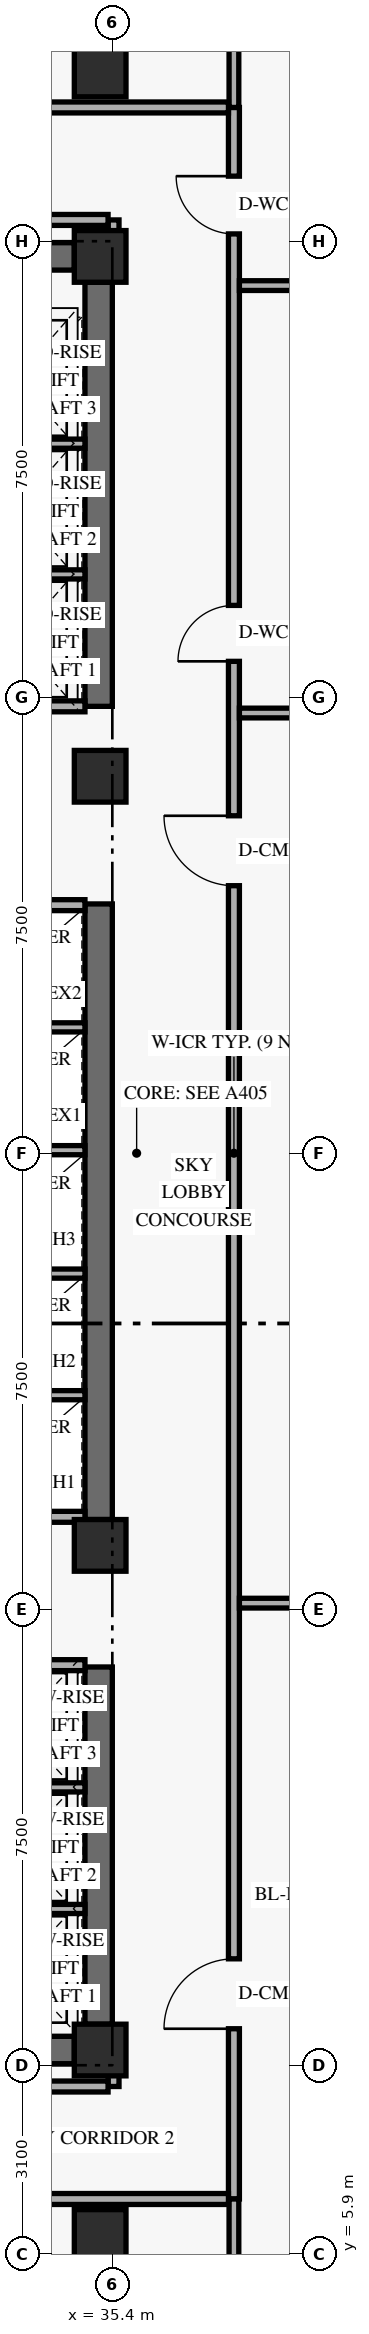
"""IFC4 building model, lengths in metres.
Left out: names, types, materials, properties, quantities, classifications, styles, units other than length and angle.
Written with IfcOpenShell. Run it as: python <this file> out.ifc"""

import sys

from ifc_helpers import new_model, si_unit, direction, frame, frame_2d, origin, origin_2d, place, context, subcontext, project, spatial, rectangle, extrude, element, fill, save


model = new_model("IFC4")
c1 = context("Model", 3, precision=1e-05, world=origin(), true_north=direction((0.0, 1.0)))
c2 = subcontext(c1, "Body", "Model", "MODEL_VIEW")
j1 = project(units=[si_unit("LENGTHUNIT", "METRE"), si_unit("PLANEANGLEUNIT", "RADIAN")], contexts=[c1])
p1 = place(None, origin())
s1 = spatial("IfcSite", under=j1, at=p1, CompositionType="ELEMENT")
p2 = place(p1, origin())
s2 = spatial("IfcBuilding", under=s1, at=p2, CompositionType="ELEMENT")
p3 = place(p2, frame((0.0, 0.0, 98.4)))
s3 = spatial("IfcBuildingStorey", under=s2, at=p3, CompositionType="ELEMENT", Elevation=98.4)
p4 = place(p3, frame((35.175, 9.675, 0.0), z_axis=(0.0, 0.0, 1.0), x_axis=(0.0, 1.0, 0.0)))
e1 = element("IfcWall", 1, at=p4, inside=s3, PredefinedType="SHEAR", context=c2, shape_type="SweptSolid", body=[
    extrude(rectangle(XDim=5.875, YDim=0.45, at=frame_2d((2.938, 0.0))), origin(), (0.0, 0.0, 1.0), 3.349),
])
p5 = place(p3, frame((35.175, 17.975, 0.0), z_axis=(0.0, 0.0, 1.0), x_axis=(0.0, 1.0, 0.0)))
e2 = element("IfcWall", 2, at=p5, inside=s3, PredefinedType="SHEAR", context=c2, shape_type="SweptSolid", body=[
    extrude(rectangle(XDim=10.125, YDim=0.45, at=frame_2d((5.062, 0.0))), origin(), (0.0, 0.0, 1.0), 3.349),
])
p6 = place(p3, frame((35.175, 31.35, 0.0), z_axis=(0.0, 0.0, 1.0), x_axis=(0.0, 1.0, 0.0)))
e3 = element("IfcWall", 3, at=p6, inside=s3, PredefinedType="SHEAR", context=c2, shape_type="SweptSolid", body=[
    extrude(rectangle(XDim=6.975, YDim=0.45, at=frame_2d((3.487, 0.0))), origin(), (0.0, 0.0, 1.0), 3.349),
])
for number, where, z_axis, x_axis in (
    (4, (24.625, 9.25, 0.0), (0.0, 0.0, 1.0), (1.0, 0.0, 0.0)),
    (5, (24.625, 38.75, 0.0), (0.0, 0.0, 1.0), (1.0, 0.0, 0.0)),
):
    element("IfcWall", number, at=place(p3, frame(where, z_axis=z_axis, x_axis=x_axis)), inside=s3, PredefinedType="SHEAR", context=c2, shape_type="SweptSolid", body=[
        extrude(rectangle(XDim=10.15, YDim=0.45, at=frame_2d((5.075, 0.0))), origin(), (0.0, 0.0, 1.0), 3.96),
    ])
for number, where, z_axis, x_axis in (
    (6, (35.2, 6.2, 0.0), (0.0, 0.0, 1.0), (1.0, 0.0, 0.0)),
    (7, (35.2, 9.25, 0.0), (0.0, 0.0, 1.0), (1.0, 0.0, 0.0)),
    (8, (35.2, 17.55, 0.0), (0.0, 0.0, 1.0), (1.0, 0.0, 0.0)),
    (9, (35.2, 30.2, 0.0), (0.0, 0.0, 1.0), (1.0, 0.0, 0.0)),
    (10, (35.2, 38.75, 0.0), (0.0, 0.0, 1.0), (1.0, 0.0, 0.0)),
    (11, (35.2, 41.8, 0.0), (0.0, 0.0, 1.0), (1.0, 0.0, 0.0)),
):
    element("IfcColumn", number, at=place(p3, frame(where, z_axis=z_axis, x_axis=x_axis)), inside=s3, PredefinedType="COLUMN", context=c2, shape_type="SweptSolid", body=[
        extrude(rectangle(XDim=0.85, YDim=0.85, at=origin_2d()), origin(), (0.0, 0.0, 1.0), 4.2),
    ])
p7 = place(p3, frame((32.74, 15.58, 0.0), z_axis=(0.0, 0.0, 1.0), x_axis=(1.0, 0.0, 0.0)))
e12 = element("IfcWall", 12, at=p7, inside=s3, PredefinedType="STANDARD", context=c2, shape_type="SweptSolid", body=[
    extrude(rectangle(XDim=2.21, YDim=0.18, at=frame_2d((1.105, 0.0))), origin(), (0.0, 0.0, 1.0), 3.96),
])
for number, where, z_axis, x_axis in (
    (13, (32.74, 11.57, 0.0), (0.0, 0.0, 1.0), (1.0, 0.0, 0.0)),
    (14, (32.74, 13.57, 0.0), (0.0, 0.0, 1.0), (1.0, 0.0, 0.0)),
):
    element("IfcWall", number, at=place(p3, frame(where, z_axis=z_axis, x_axis=x_axis)), inside=s3, PredefinedType="STANDARD", context=c2, shape_type="SweptSolid", body=[
        extrude(rectangle(XDim=2.21, YDim=0.15, at=frame_2d((1.105, 0.0))), origin(), (0.0, 0.0, 1.0), 3.96),
    ])
for number, where, z_axis, x_axis in (
    (15, (32.74, 18.02, 0.0), (0.0, 0.0, 1.0), (1.0, 0.0, 0.0)),
    (16, (32.74, 28.08, 0.0), (0.0, 0.0, 1.0), (1.0, 0.0, 0.0)),
):
    element("IfcWall", number, at=place(p3, frame(where, z_axis=z_axis, x_axis=x_axis)), inside=s3, PredefinedType="STANDARD", context=c2, shape_type="SweptSolid", body=[
        extrude(rectangle(XDim=2.21, YDim=0.18, at=frame_2d((1.105, 0.0))), origin(), (0.0, 0.0, 1.0), 3.96),
    ])
for number, where, z_axis, x_axis in (
    (17, (32.74, 20.02, 0.0), (0.0, 0.0, 1.0), (1.0, 0.0, 0.0)),
    (18, (32.74, 22.02, 0.0), (0.0, 0.0, 1.0), (1.0, 0.0, 0.0)),
    (19, (32.74, 24.05, 0.0), (0.0, 0.0, 1.0), (1.0, 0.0, 0.0)),
    (20, (32.74, 26.07, 0.0), (0.0, 0.0, 1.0), (1.0, 0.0, 0.0)),
):
    element("IfcWall", number, at=place(p3, frame(where, z_axis=z_axis, x_axis=x_axis)), inside=s3, PredefinedType="STANDARD", context=c2, shape_type="SweptSolid", body=[
        extrude(rectangle(XDim=2.21, YDim=0.15, at=frame_2d((1.105, 0.0))), origin(), (0.0, 0.0, 1.0), 3.96),
    ])
p8 = place(p3, frame((32.74, 31.35, 0.0), z_axis=(0.0, 0.0, 1.0), x_axis=(1.0, 0.0, 0.0)))
e21 = element("IfcWall", 21, at=p8, inside=s3, PredefinedType="STANDARD", context=c2, shape_type="SweptSolid", body=[
    extrude(rectangle(XDim=2.21, YDim=0.18, at=frame_2d((1.105, 0.0))), origin(), (0.0, 0.0, 1.0), 3.96),
])
for number, where, z_axis, x_axis in (
    (22, (32.74, 33.52, 0.0), (0.0, 0.0, 1.0), (1.0, 0.0, 0.0)),
    (23, (32.74, 35.67, 0.0), (0.0, 0.0, 1.0), (1.0, 0.0, 0.0)),
):
    element("IfcWall", number, at=place(p3, frame(where, z_axis=z_axis, x_axis=x_axis)), inside=s3, PredefinedType="STANDARD", context=c2, shape_type="SweptSolid", body=[
        extrude(rectangle(XDim=2.21, YDim=0.15, at=frame_2d((1.105, 0.0))), origin(), (0.0, 0.0, 1.0), 3.96),
    ])
p9 = place(p3, frame((37.4, 6.8, 0.0), z_axis=(0.0, 0.0, 1.0), x_axis=(0.0, 1.0, 0.0)))
e24 = element("IfcWall", 24, at=p9, inside=s3, PredefinedType="STANDARD", context=c2, shape_type="SweptSolid", body=[
    extrude(rectangle(XDim=34.4, YDim=0.18, at=frame_2d((17.2, 0.0))), origin(), (0.0, 0.0, 1.0), 3.331),
])
p10 = place(p9, frame((25.29, 0.0, 0.0)))
e25 = element("IfcOpeningElement", 25, at=p10, cuts=e24, PredefinedType="OPENING", context=c2, shape_type="SweptSolid", body=[
    extrude(rectangle(XDim=0.92, YDim=2.14, at=frame_2d((0.46, 1.07))), frame((0.0, 0.1, 0.0), z_axis=(0.0, -1.0, 0.0), x_axis=(1.0, 0.0, 0.0)), (0.0, 0.0, 1.0), 0.2),
])
p11 = place(p9, frame((32.32, 0.0, 0.0)))
e26 = element("IfcOpeningElement", 26, at=p11, cuts=e24, PredefinedType="OPENING", context=c2, shape_type="SweptSolid", body=[
    extrude(rectangle(XDim=0.95, YDim=2.14, at=frame_2d((0.475, 1.07))), frame((0.0, 0.1, 0.0), z_axis=(0.0, -1.0, 0.0), x_axis=(1.0, 0.0, 0.0)), (0.0, 0.0, 1.0), 0.2),
])
p12 = place(p9, frame((2.8, 0.0, 0.0)))
e27 = element("IfcOpeningElement", 27, at=p12, cuts=e24, PredefinedType="OPENING", context=c2, shape_type="SweptSolid", body=[
    extrude(rectangle(XDim=1.15, YDim=2.15, at=frame_2d((0.575, 1.075))), frame((0.0, 0.1, 0.0), z_axis=(0.0, -1.0, 0.0), x_axis=(1.0, 0.0, 0.0)), (0.0, 0.0, 1.0), 0.2),
])
p13 = place(p9, frame((21.6, 0.0, 0.0)))
e28 = element("IfcOpeningElement", 28, at=p13, cuts=e24, PredefinedType="OPENING", context=c2, shape_type="SweptSolid", body=[
    extrude(rectangle(XDim=1.15, YDim=2.15, at=frame_2d((0.575, 1.075))), frame((0.0, 0.1, 0.0), z_axis=(0.0, -1.0, 0.0), x_axis=(1.0, 0.0, 0.0)), (0.0, 0.0, 1.0), 0.2),
])
for number, where, z_axis, x_axis in (
    (29, (37.4, 2.98, 0.0), (0.0, 0.0, 1.0), (0.0, 1.0, 0.0)),
    (30, (37.4, 41.2, 0.0), (0.0, 0.0, 1.0), (0.0, 1.0, 0.0)),
):
    element("IfcWall", number, at=place(p3, frame(where, z_axis=z_axis, x_axis=x_axis)), inside=s3, PredefinedType="PARTITIONING", context=c2, shape_type="SweptSolid", body=[
        extrude(rectangle(XDim=3.82, YDim=0.16, at=frame_2d((1.91, 0.0))), origin(), (0.0, 0.0, 1.0), 3.409),
    ])
for number, where, z_axis, x_axis in (
    (31, (35.42, 8.65, 0.0), (0.0, 0.0, 1.0), (0.0, 1.0, 0.0)),
    (32, (35.42, 38.75, 0.0), (0.0, 0.0, 1.0), (0.0, 1.0, 0.0)),
):
    element("IfcWall", number, at=place(p3, frame(where, z_axis=z_axis, x_axis=x_axis)), inside=s3, PredefinedType="STANDARD", context=c2, shape_type="SweptSolid", body=[
        extrude(rectangle(XDim=0.6, YDim=0.18, at=frame_2d((0.3, 0.0))), origin(), (0.0, 0.0, 1.0), 3.331),
    ])
for number, where, z_axis, x_axis in (
    (33, (37.49, 16.6, 0.0), (0.0, 0.0, 1.0), (1.0, 0.0, 0.0)),
    (34, (37.49, 31.24, 0.0), (0.0, 0.0, 1.0), (1.0, 0.0, 0.0)),
):
    element("IfcWall", number, at=place(p3, frame(where, z_axis=z_axis, x_axis=x_axis)), inside=s3, PredefinedType="PARTITIONING", context=c2, shape_type="SweptSolid", body=[
        extrude(rectangle(XDim=15.83, YDim=0.16, at=frame_2d((7.915, 0.0))), origin(), (0.0, 0.0, 1.0), 3.331),
    ])
p14 = place(p3, frame((37.49, 38.27, 0.0), z_axis=(0.0, 0.0, 1.0), x_axis=(1.0, 0.0, 0.0)))
e35 = element("IfcWall", 35, at=p14, inside=s3, PredefinedType="PLUMBINGWALL", context=c2, shape_type="SweptSolid", body=[
    extrude(rectangle(XDim=5.93, YDim=0.16, at=frame_2d((2.965, 0.0))), origin(), (0.0, 0.0, 1.0), 3.331),
])
p15 = place(p3, frame((21.74, 6.8, 0.0), z_axis=(0.0, 0.0, 1.0), x_axis=(1.0, 0.0, 0.0)))
e36 = element("IfcWall", 36, at=p15, inside=s3, PredefinedType="STANDARD", context=c2, shape_type="SweptSolid", body=[
    extrude(rectangle(XDim=15.57, YDim=0.18, at=frame_2d((7.785, 0.0))), origin(), (0.0, 0.0, 1.0), 3.331),
])
p16 = place(p15, frame((5.41, 0.0, 0.0)))
e37 = element("IfcOpeningElement", 37, at=p16, cuts=e36, PredefinedType="OPENING", context=c2, shape_type="SweptSolid", body=[
    extrude(rectangle(XDim=0.95, YDim=2.15, at=frame_2d((0.475, 1.075))), frame((0.0, 0.1, 0.0), z_axis=(0.0, -1.0, 0.0), x_axis=(1.0, 0.0, 0.0)), (0.0, 0.0, 1.0), 0.2),
])
p17 = place(p3, frame((23.85, 8.65, 0.0), z_axis=(0.0, 0.0, 1.0), x_axis=(1.0, 0.0, 0.0)))
e38 = element("IfcWall", 38, at=p17, inside=s3, PredefinedType="STANDARD", context=c2, shape_type="SweptSolid", body=[
    extrude(rectangle(XDim=11.48, YDim=0.18, at=frame_2d((5.74, 0.0))), origin(), (0.0, 0.0, 1.0), 3.331),
])
p18 = place(p3, frame((21.74, 41.2, 0.0), z_axis=(0.0, 0.0, 1.0), x_axis=(1.0, 0.0, 0.0)))
e39 = element("IfcWall", 39, at=p18, inside=s3, PredefinedType="STANDARD", context=c2, shape_type="SweptSolid", body=[
    extrude(rectangle(XDim=15.57, YDim=0.18, at=frame_2d((7.785, 0.0))), origin(), (0.0, 0.0, 1.0), 3.331),
])
p19 = place(p18, frame((5.41, 0.0, 0.0)))
e40 = element("IfcOpeningElement", 40, at=p19, cuts=e39, PredefinedType="OPENING", context=c2, shape_type="SweptSolid", body=[
    extrude(rectangle(XDim=0.95, YDim=2.15, at=frame_2d((0.475, 1.075))), frame((0.0, 0.1, 0.0), z_axis=(0.0, -1.0, 0.0), x_axis=(1.0, 0.0, 0.0)), (0.0, 0.0, 1.0), 0.2),
])
p20 = place(p3, frame((23.85, 39.35, 0.0), z_axis=(0.0, 0.0, 1.0), x_axis=(1.0, 0.0, 0.0)))
e41 = element("IfcWall", 41, at=p20, inside=s3, PredefinedType="STANDARD", context=c2, shape_type="SweptSolid", body=[
    extrude(rectangle(XDim=11.48, YDim=0.18, at=frame_2d((5.74, 0.0))), origin(), (0.0, 0.0, 1.0), 3.331),
])
p21 = place(p10, origin())
e42 = element("IfcDoor", 42, at=p21, inside=s3, OperationType="SINGLE_SWING_LEFT", PredefinedType="DOOR", context=c2, shape_type="SweptSolid", body=[
    extrude(rectangle(XDim=0.92, YDim=2.14, at=frame_2d((0.46, 1.07))), frame((0.0, 0.025, 0.0), z_axis=(0.0, -1.0, 0.0), x_axis=(1.0, 0.0, 0.0)), (0.0, 0.0, 1.0), 0.05),
])
fill(e25, e42)
p22 = place(p11, origin())
e43 = element("IfcDoor", 43, at=p22, inside=s3, OperationType="SINGLE_SWING_RIGHT", PredefinedType="DOOR", context=c2, shape_type="SweptSolid", body=[
    extrude(rectangle(XDim=0.95, YDim=2.14, at=frame_2d((0.475, 1.07))), frame((0.0, 0.025, 0.0), z_axis=(0.0, -1.0, 0.0), x_axis=(1.0, 0.0, 0.0)), (0.0, 0.0, 1.0), 0.05),
])
fill(e26, e43)
p23 = place(p12, origin())
e44 = element("IfcDoor", 44, at=p23, inside=s3, OperationType="SINGLE_SWING_LEFT", PredefinedType="DOOR", context=c2, shape_type="SweptSolid", body=[
    extrude(rectangle(XDim=1.15, YDim=2.15, at=frame_2d((0.575, 1.075))), frame((0.0, 0.025, 0.0), z_axis=(0.0, -1.0, 0.0), x_axis=(1.0, 0.0, 0.0)), (0.0, 0.0, 1.0), 0.05),
])
fill(e27, e44)
p24 = place(p13, origin())
e45 = element("IfcDoor", 45, at=p24, inside=s3, OperationType="SINGLE_SWING_RIGHT", PredefinedType="DOOR", context=c2, shape_type="SweptSolid", body=[
    extrude(rectangle(XDim=1.15, YDim=2.15, at=frame_2d((0.575, 1.075))), frame((0.0, 0.025, 0.0), z_axis=(0.0, -1.0, 0.0), x_axis=(1.0, 0.0, 0.0)), (0.0, 0.0, 1.0), 0.05),
])
fill(e28, e45)
save(model, sys.argv[1])
